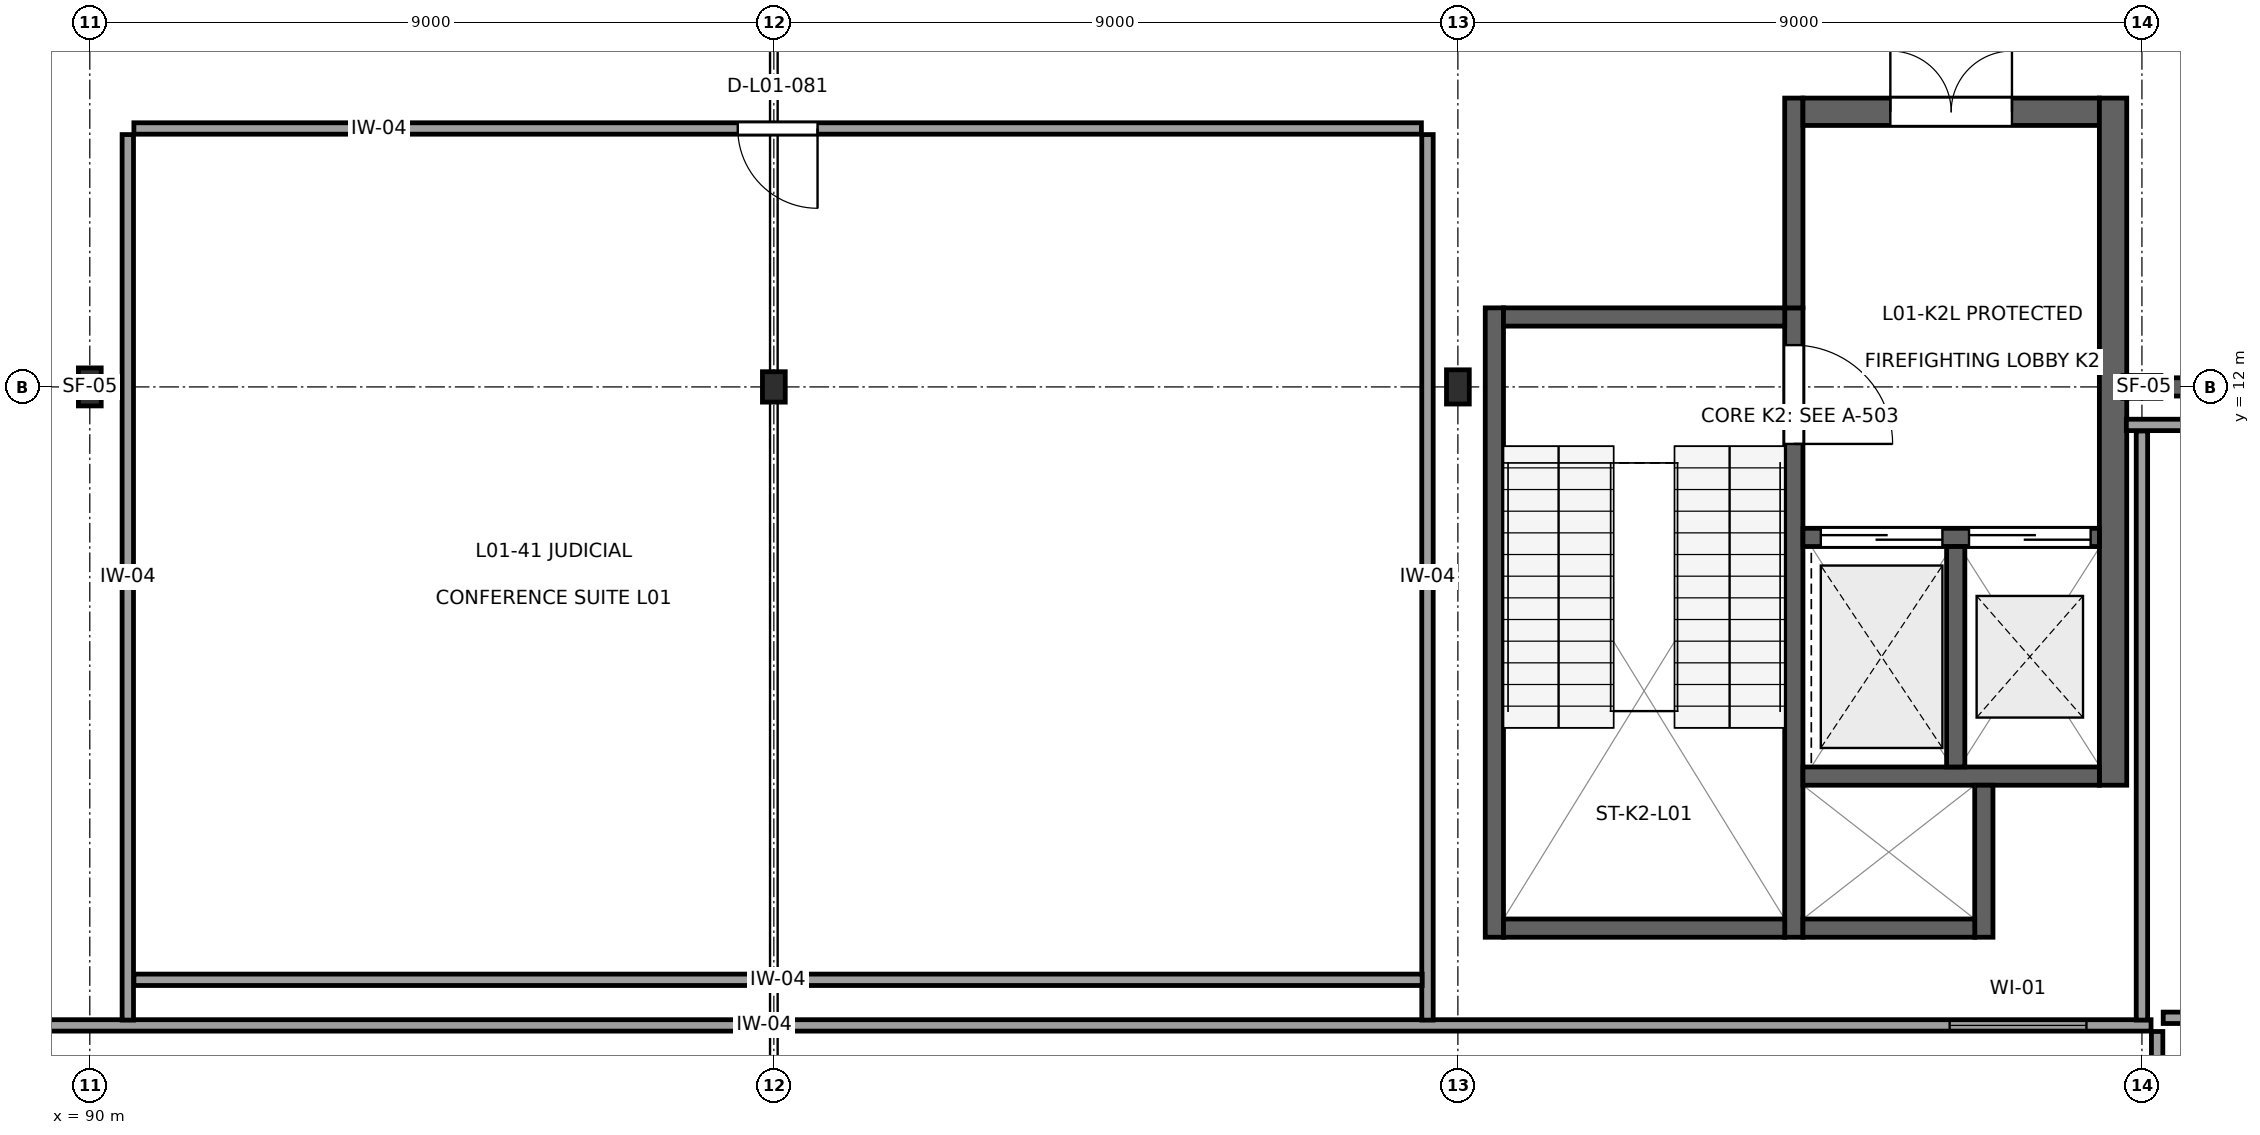
"""IFC4 building model, lengths in metres.
Left out: names, types, materials, properties, quantities, classifications, styles, units other than length and angle.
Written with IfcOpenShell. Run it as: python <this file> out.ifc"""

import sys

from ifc_helpers import new_model, si_unit, direction, frame, frame_2d, origin, origin_2d, place, context, subcontext, project, spatial, rectangle, i_section, extrude, element, fill, save


model = new_model("IFC4")
c1 = context("Model", 3, precision=1e-05, world=origin(), true_north=direction((0.0, 1.0)))
c2 = subcontext(c1, "Body", "Model", "MODEL_VIEW")
j1 = project(units=[si_unit("LENGTHUNIT", "METRE"), si_unit("PLANEANGLEUNIT", "RADIAN")], contexts=[c1])
p1 = place(None, origin())
s1 = spatial("IfcSite", under=j1, at=p1, CompositionType="ELEMENT")
p2 = place(p1, origin())
s2 = spatial("IfcBuilding", under=s1, at=p2, CompositionType="ELEMENT")
p3 = place(p2, frame((0.0, 0.0, 5.4)))
s3 = spatial("IfcBuildingStorey", under=s2, at=p3, CompositionType="ELEMENT", Elevation=5.4)
p4 = place(p3, frame((90.0, 12.0, 0.0), z_axis=(0.0, 0.0, 1.0), x_axis=(1.0, 0.0, 0.0)))
e1 = element("IfcColumn", 1, at=p4, inside=s3, PredefinedType="COLUMN", context=c2, shape_type="SweptSolid", body=[
    extrude(i_section(OverallWidth=0.3, OverallDepth=0.5, WebThickness=0.014, FlangeThickness=0.028, at=origin_2d()), origin(), (0.0, 0.0, 1.0), 4.5),
])
p5 = place(p3, frame((99.0, 12.0, 0.0), z_axis=(0.0, 0.0, 1.0), x_axis=(1.0, 0.0, 0.0)))
e2 = element("IfcColumn", 2, at=p5, inside=s3, PredefinedType="COLUMN", context=c2, shape_type="SweptSolid", body=[
    extrude(i_section(OverallWidth=0.3, OverallDepth=0.4, WebThickness=0.013, FlangeThickness=0.024, at=origin_2d()), origin(), (0.0, 0.0, 1.0), 4.5),
])
p6 = place(p3, frame((108.0, 12.0, 0.0), z_axis=(0.0, 0.0, 1.0), x_axis=(1.0, 0.0, 0.0)))
e3 = element("IfcColumn", 3, at=p6, inside=s3, PredefinedType="COLUMN", context=c2, shape_type="SweptSolid", body=[
    extrude(i_section(OverallWidth=0.3, OverallDepth=0.45, WebThickness=0.014, FlangeThickness=0.026, at=origin_2d()), origin(), (0.0, 0.0, 1.0), 4.5),
])
p7 = place(p3, frame((117.0, 12.0, 0.0), z_axis=(0.0, 0.0, 1.0), x_axis=(0.0, 1.0, 0.0)))
e4 = element("IfcColumn", 4, at=p7, inside=s3, PredefinedType="COLUMN", context=c2, shape_type="SweptSolid", body=[
    extrude(i_section(OverallWidth=0.3, OverallDepth=0.5, WebThickness=0.014, FlangeThickness=0.028, at=origin_2d()), origin(), (0.0, 0.0, 1.0), 4.5),
])
p8 = place(p3, frame((108.48, 4.76, 0.0), z_axis=(0.0, 0.0, 1.0), x_axis=(0.0, 1.0, 0.0)))
e5 = element("IfcWall", 5, at=p8, inside=s3, PredefinedType="SHEAR", context=c2, shape_type="SweptSolid", body=[
    extrude(rectangle(XDim=8.28, YDim=0.24, at=frame_2d((4.14, 0.0))), origin(), (0.0, 0.0, 1.0), 4.31),
])
p9 = place(p3, frame((112.42, 4.76, 0.0), z_axis=(0.0, 0.0, 1.0), x_axis=(0.0, 1.0, 0.0)))
e6 = element("IfcWall", 6, at=p9, inside=s3, PredefinedType="SHEAR", context=c2, shape_type="SweptSolid", body=[
    extrude(rectangle(XDim=8.28, YDim=0.24, at=frame_2d((4.14, 0.0))), origin(), (0.0, 0.0, 1.0), 4.31),
])
p10 = place(p9, frame((6.49, 0.0, 0.0)))
e7 = element("IfcOpeningElement", 7, at=p10, cuts=e6, PredefinedType="OPENING", context=c2, shape_type="SweptSolid", body=[
    extrude(rectangle(XDim=1.3, YDim=2.2, at=frame_2d((0.65, 1.1))), frame((0.0, 0.135, 0.0), z_axis=(0.0, -1.0, 0.0), x_axis=(1.0, 0.0, 0.0)), (0.0, 0.0, 1.0), 0.27),
])
for number, where, z_axis, x_axis in (
    (8, (108.6, 4.88, 0.0), (0.0, 0.0, 1.0), (1.0, 0.0, 0.0)),
    (9, (108.6, 12.92, 0.0), (0.0, 0.0, 1.0), (1.0, 0.0, 0.0)),
):
    element("IfcWall", number, at=place(p3, frame(where, z_axis=z_axis, x_axis=x_axis)), inside=s3, PredefinedType="SHEAR", context=c2, shape_type="SweptSolid", body=[
        extrude(rectangle(XDim=3.7, YDim=0.24, at=frame_2d((1.85, 0.0))), origin(), (0.0, 0.0, 1.0), 4.31),
    ])
p11 = place(p3, frame((112.42, 13.04, 0.0), z_axis=(0.0, 0.0, 1.0), x_axis=(0.0, 1.0, 0.0)))
e10 = element("IfcWall", 10, at=p11, inside=s3, PredefinedType="SHEAR", context=c2, shape_type="SweptSolid", body=[
    extrude(rectangle(XDim=2.76, YDim=0.24, at=frame_2d((1.38, 0.0))), origin(), (0.0, 0.0, 1.0), 4.16),
])
p12 = place(p3, frame((112.54, 15.62, 0.0), z_axis=(0.0, 0.0, 1.0), x_axis=(1.0, 0.0, 0.0)))
e11 = element("IfcWall", 11, at=p12, inside=s3, PredefinedType="SHEAR", context=c2, shape_type="SweptSolid", body=[
    extrude(rectangle(XDim=3.9, YDim=0.36, at=frame_2d((1.95, 0.0))), origin(), (0.0, 0.0, 1.0), 4.16),
])
p13 = place(p12, frame((1.15, 0.0, 0.0)))
e12 = element("IfcOpeningElement", 12, at=p13, cuts=e11, PredefinedType="OPENING", context=c2, shape_type="SweptSolid", body=[
    extrude(rectangle(XDim=1.6, YDim=2.25, at=frame_2d((0.8, 1.125))), frame((0.0, 0.195, 0.0), z_axis=(0.0, -1.0, 0.0), x_axis=(1.0, 0.0, 0.0)), (0.0, 0.0, 1.0), 0.39),
])
p14 = place(p3, frame((116.62, 6.76, 0.0), z_axis=(0.0, 0.0, 1.0), x_axis=(0.0, 1.0, 0.0)))
e13 = element("IfcWall", 13, at=p14, inside=s3, PredefinedType="SHEAR", context=c2, shape_type="SweptSolid", body=[
    extrude(rectangle(XDim=9.04, YDim=0.36, at=frame_2d((4.52, 0.0))), origin(), (0.0, 0.0, 1.0), 4.16),
])
p15 = place(p3, frame((112.54, 10.02, 0.0), z_axis=(0.0, 0.0, 1.0), x_axis=(1.0, 0.0, 0.0)))
e14 = element("IfcWall", 14, at=p15, inside=s3, PredefinedType="SHEAR", context=c2, shape_type="SweptSolid", body=[
    extrude(rectangle(XDim=3.9, YDim=0.24, at=frame_2d((1.95, 0.0))), origin(), (0.0, 0.0, 1.0), 4.31),
])
p16 = place(p15, frame((0.235, 0.0, 0.0)))
e15 = element("IfcOpeningElement", 15, at=p16, cuts=e14, PredefinedType="OPENING", context=c2, shape_type="SweptSolid", body=[
    extrude(rectangle(XDim=1.6, YDim=2.3, at=frame_2d((0.8, 1.15))), frame((0.0, 0.135, 0.0), z_axis=(0.0, -1.0, 0.0), x_axis=(1.0, 0.0, 0.0)), (0.0, 0.0, 1.0), 0.27),
])
p17 = place(p15, frame((2.185, 0.0, 0.0)))
e16 = element("IfcOpeningElement", 16, at=p17, cuts=e14, PredefinedType="OPENING", context=c2, shape_type="SweptSolid", body=[
    extrude(rectangle(XDim=1.6, YDim=2.3, at=frame_2d((0.8, 1.15))), frame((0.0, 0.135, 0.0), z_axis=(0.0, -1.0, 0.0), x_axis=(1.0, 0.0, 0.0)), (0.0, 0.0, 1.0), 0.27),
])
p18 = place(p3, frame((112.54, 6.88, 0.0), z_axis=(0.0, 0.0, 1.0), x_axis=(1.0, 0.0, 0.0)))
e17 = element("IfcWall", 17, at=p18, inside=s3, PredefinedType="SHEAR", context=c2, shape_type="SweptSolid", body=[
    extrude(rectangle(XDim=3.9, YDim=0.24, at=frame_2d((1.95, 0.0))), origin(), (0.0, 0.0, 1.0), 4.31),
])
p19 = place(p3, frame((114.55, 7.0, 0.0), z_axis=(0.0, 0.0, 1.0), x_axis=(0.0, 1.0, 0.0)))
e18 = element("IfcWall", 18, at=p19, inside=s3, PredefinedType="SHEAR", context=c2, shape_type="SweptSolid", body=[
    extrude(rectangle(XDim=2.9, YDim=0.24, at=frame_2d((1.45, 0.0))), origin(), (0.0, 0.0, 1.0), 4.31),
])
p20 = place(p3, frame((114.92, 4.76, 0.0), z_axis=(0.0, 0.0, 1.0), x_axis=(0.0, 1.0, 0.0)))
e19 = element("IfcWall", 19, at=p20, inside=s3, PredefinedType="SHEAR", context=c2, shape_type="SweptSolid", body=[
    extrude(rectangle(XDim=2.0, YDim=0.24, at=frame_2d((1.0, 0.0))), origin(), (0.0, 0.0, 1.0), 4.31),
])
p21 = place(p3, frame((112.54, 4.88, 0.0), z_axis=(0.0, 0.0, 1.0), x_axis=(1.0, 0.0, 0.0)))
e20 = element("IfcWall", 20, at=p21, inside=s3, PredefinedType="SHEAR", context=c2, shape_type="SweptSolid", body=[
    extrude(rectangle(XDim=2.26, YDim=0.24, at=frame_2d((1.13, 0.0))), origin(), (0.0, 0.0, 1.0), 4.31),
])
p22 = place(p3, frame((117.248, 12.0, 0.0), z_axis=(0.0, 0.0, 1.0), x_axis=(1.0, 0.0, 0.0)))
e21 = element("IfcWall", 21, at=p22, inside=s3, PredefinedType="SHEAR", context=c2, shape_type="SweptSolid", body=[
    extrude(rectangle(XDim=8.744, YDim=0.24, at=frame_2d((4.372, 0.0))), origin(), (0.0, 0.0, 1.0), 3.585),
])
p23 = place(p3, frame((46.08, 3.6, 0.0), z_axis=(0.0, 0.0, 1.0), x_axis=(1.0, 0.0, 0.0)))
e22 = element("IfcWall", 22, at=p23, inside=s3, PredefinedType="PARTITIONING", context=c2, shape_type="SweptSolid", body=[
    extrude(rectangle(XDim=71.04, YDim=0.15, at=frame_2d((35.52, 0.0))), origin(), (0.0, 0.0, 1.0), 4.14),
])
p24 = place(p23, frame((31.995, 0.0, 0.0)))
e23 = element("IfcOpeningElement", 23, at=p24, cuts=e22, PredefinedType="OPENING", context=c2, shape_type="SweptSolid", body=[
    extrude(rectangle(XDim=1.05, YDim=2.25, at=frame_2d((0.525, 1.125))), frame((0.0, 0.09, 0.0), z_axis=(0.0, -1.0, 0.0), x_axis=(1.0, 0.0, 0.0)), (0.0, 0.0, 1.0), 0.18),
])
p25 = place(p23, frame((68.39, 0.0, 1.05)))
e24 = element("IfcOpeningElement", 24, at=p25, cuts=e22, PredefinedType="OPENING", context=c2, shape_type="SweptSolid", body=[
    extrude(rectangle(XDim=1.8, YDim=1.1, at=frame_2d((0.9, 0.55))), frame((0.0, 0.09, 0.0), z_axis=(0.0, -1.0, 0.0), x_axis=(1.0, 0.0, 0.0)), (0.0, 0.0, 1.0), 0.18),
])
p26 = place(p3, frame((117.2, 3.52, 0.0), z_axis=(0.0, 0.0, 1.0), x_axis=(0.0, -1.0, 0.0)))
e25 = element("IfcWall", 25, at=p26, inside=s3, PredefinedType="PARTITIONING", context=c2, shape_type="SweptSolid", body=[
    extrude(rectangle(XDim=3.297, YDim=0.15, at=frame_2d((1.648, 0.0))), origin(), (0.0, 0.0, 1.0), 3.685),
])
p27 = place(p3, frame((134.855, 3.7, 0.0), z_axis=(0.0, 0.0, 1.0), x_axis=(-1.0, 0.0, 0.0)))
e26 = element("IfcWall", 26, at=p27, inside=s3, PredefinedType="PARTITIONING", context=c2, shape_type="SweptSolid", body=[
    extrude(rectangle(XDim=17.575, YDim=0.15, at=frame_2d((8.788, 0.0))), origin(), (0.0, 0.0, 1.0), 4.14),
])
p28 = place(p3, frame((117.0, 3.67, 0.0), z_axis=(0.0, 0.0, 1.0), x_axis=(0.0, 1.0, 0.0)))
e27 = element("IfcWall", 27, at=p28, inside=s3, PredefinedType="PARTITIONING", context=c2, shape_type="SweptSolid", body=[
    extrude(rectangle(XDim=7.75, YDim=0.15, at=frame_2d((3.875, 0.0))), origin(), (0.0, 0.0, 1.0), 3.685),
])
p29 = place(p3, frame((116.795, 11.5, 0.0), z_axis=(0.0, 0.0, 1.0), x_axis=(1.0, 0.0, 0.0)))
e28 = element("IfcWall", 28, at=p29, inside=s3, PredefinedType="PARTITIONING", context=c2, shape_type="SweptSolid", body=[
    extrude(rectangle(XDim=9.425, YDim=0.15, at=frame_2d((4.712, 0.0))), origin(), (0.0, 0.0, 1.0), 4.14),
])
p30 = place(p3, frame((107.6, 15.32, 0.0), z_axis=(0.0, 0.0, 1.0), x_axis=(0.0, -1.0, 0.0)))
e29 = element("IfcWall", 29, at=p30, inside=s3, PredefinedType="PARTITIONING", context=c2, shape_type="SweptSolid", body=[
    extrude(rectangle(XDim=11.65, YDim=0.15, at=frame_2d((5.825, 0.0))), origin(), (0.0, 0.0, 1.0), 4.14),
])
p31 = place(p3, frame((107.53, 4.2, 0.0), z_axis=(0.0, 0.0, 1.0), x_axis=(-1.0, 0.0, 0.0)))
e30 = element("IfcWall", 30, at=p31, inside=s3, PredefinedType="PARTITIONING", context=c2, shape_type="SweptSolid", body=[
    extrude(rectangle(XDim=16.95, YDim=0.15, at=frame_2d((8.475, 0.0))), origin(), (0.0, 0.0, 1.0), 4.14),
])
p32 = place(p3, frame((90.5, 3.67, 0.0), z_axis=(0.0, 0.0, 1.0), x_axis=(0.0, 1.0, 0.0)))
e31 = element("IfcWall", 31, at=p32, inside=s3, PredefinedType="PARTITIONING", context=c2, shape_type="SweptSolid", body=[
    extrude(rectangle(XDim=11.65, YDim=0.15, at=frame_2d((5.825, 0.0))), origin(), (0.0, 0.0, 1.0), 4.14),
])
p33 = place(p3, frame((90.58, 15.4, 0.0), z_axis=(0.0, 0.0, 1.0), x_axis=(1.0, 0.0, 0.0)))
e32 = element("IfcWall", 32, at=p33, inside=s3, PredefinedType="PARTITIONING", context=c2, shape_type="SweptSolid", body=[
    extrude(rectangle(XDim=16.94, YDim=0.15, at=frame_2d((8.47, 0.0))), origin(), (0.0, 0.0, 1.0), 4.14),
])
p34 = place(p33, frame((7.945, 0.0, 0.0)))
e33 = element("IfcOpeningElement", 33, at=p34, cuts=e32, PredefinedType="OPENING", context=c2, shape_type="SweptSolid", body=[
    extrude(rectangle(XDim=1.05, YDim=2.25, at=frame_2d((0.525, 1.125))), frame((0.0, 0.09, 0.0), z_axis=(0.0, -1.0, 0.0), x_axis=(1.0, 0.0, 0.0)), (0.0, 0.0, 1.0), 0.18),
])
p35 = place(p10, frame((1.3, 0.0, 0.0), z_axis=(0.0, 0.0, 1.0), x_axis=(-1.0, 0.0, 0.0)))
e34 = element("IfcDoor", 34, at=p35, inside=s3, OperationType="SINGLE_SWING_LEFT", PredefinedType="DOOR", context=c2, shape_type="SweptSolid", body=[
    extrude(rectangle(XDim=1.3, YDim=2.2, at=frame_2d((0.65, 1.1))), frame((0.0, 0.025, 0.0), z_axis=(0.0, -1.0, 0.0), x_axis=(1.0, 0.0, 0.0)), (0.0, 0.0, 1.0), 0.05),
])
fill(e7, e34)
p36 = place(p13, origin())
e35 = element("IfcDoor", 35, at=p36, inside=s3, OperationType="DOUBLE_DOOR_SINGLE_SWING", PredefinedType="DOOR", context=c2, shape_type="SweptSolid", body=[
    extrude(rectangle(XDim=1.6, YDim=2.25, at=frame_2d((0.8, 1.125))), frame((0.0, 0.025, 0.0), z_axis=(0.0, -1.0, 0.0), x_axis=(1.0, 0.0, 0.0)), (0.0, 0.0, 1.0), 0.05),
])
fill(e12, e35)
p37 = place(p16, origin())
e36 = element("IfcDoor", 36, at=p37, inside=s3, OperationType="DOUBLE_DOOR_SLIDING", PredefinedType="DOOR", context=c2, shape_type="SweptSolid", body=[
    extrude(rectangle(XDim=1.6, YDim=2.3, at=frame_2d((0.8, 1.15))), frame((0.0, 0.025, 0.0), z_axis=(0.0, -1.0, 0.0), x_axis=(1.0, 0.0, 0.0)), (0.0, 0.0, 1.0), 0.05),
])
fill(e15, e36)
p38 = place(p17, origin())
e37 = element("IfcDoor", 37, at=p38, inside=s3, OperationType="DOUBLE_DOOR_SLIDING", PredefinedType="DOOR", context=c2, shape_type="SweptSolid", body=[
    extrude(rectangle(XDim=1.6, YDim=2.3, at=frame_2d((0.8, 1.15))), frame((0.0, 0.025, 0.0), z_axis=(0.0, -1.0, 0.0), x_axis=(1.0, 0.0, 0.0)), (0.0, 0.0, 1.0), 0.05),
])
fill(e16, e37)
p39 = place(p25, origin())
e38 = element("IfcWindow", 38, at=p39, inside=s3, PartitioningType="SINGLE_PANEL", PredefinedType="WINDOW", context=c2, shape_type="SweptSolid", body=[
    extrude(rectangle(XDim=1.8, YDim=1.1, at=frame_2d((0.9, 0.55))), frame((0.0, 0.03, 0.0), z_axis=(0.0, -1.0, 0.0), x_axis=(1.0, 0.0, 0.0)), (0.0, 0.0, 1.0), 0.06),
])
fill(e24, e38)
p40 = place(p34, frame((1.05, 0.0, 0.0), z_axis=(0.0, 0.0, 1.0), x_axis=(-1.0, 0.0, 0.0)))
e39 = element("IfcDoor", 39, at=p40, inside=s3, OperationType="SINGLE_SWING_RIGHT", PredefinedType="DOOR", context=c2, shape_type="SweptSolid", body=[
    extrude(rectangle(XDim=1.05, YDim=2.25, at=frame_2d((0.525, 1.125))), frame((0.0, 0.025, 0.0), z_axis=(0.0, -1.0, 0.0), x_axis=(1.0, 0.0, 0.0)), (0.0, 0.0, 1.0), 0.05),
])
fill(e33, e39)
save(model, sys.argv[1])
